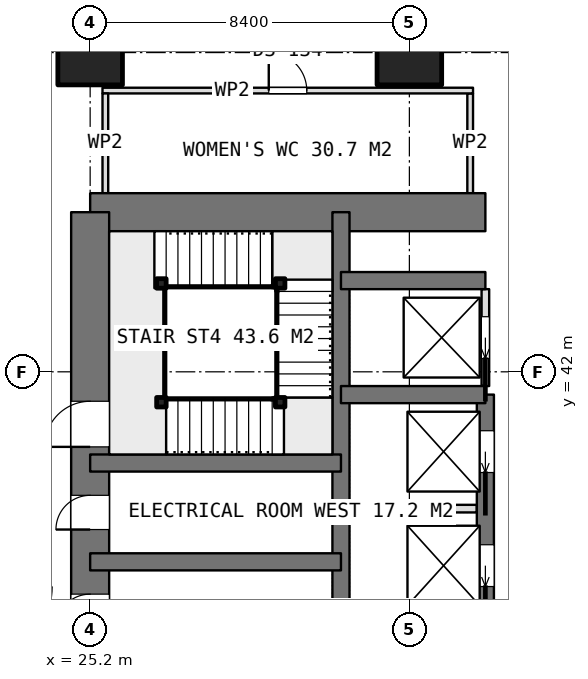
"""IFC4 building model, lengths in metres.
Left out: names, types, materials, properties, quantities, classifications, styles, units other than length and angle.
Written with IfcOpenShell. Run it as: python <this file> out.ifc"""

import sys

from ifc_helpers import new_model, si_unit, direction, frame, frame_2d, origin, origin_2d, place, context, subcontext, project, spatial, rectangle, extrude, element, fill, save


model = new_model("IFC4")
c1 = context("Model", 3, precision=1e-05, world=origin(), true_north=direction((0.0, 1.0)))
c2 = subcontext(c1, "Body", "Model", "MODEL_VIEW")
j1 = project(units=[si_unit("LENGTHUNIT", "METRE"), si_unit("PLANEANGLEUNIT", "RADIAN")], contexts=[c1])
p1 = place(None, origin())
s1 = spatial("IfcSite", under=j1, at=p1, CompositionType="ELEMENT")
p2 = place(p1, origin())
s2 = spatial("IfcBuilding", under=s1, at=p2, CompositionType="ELEMENT")
p3 = place(p2, frame((0.0, 0.0, 125.3)))
s3 = spatial("IfcBuildingStorey", under=s2, at=p3, CompositionType="ELEMENT", Elevation=125.3)
p4 = place(p3, frame((25.2, 46.2, 0.0), z_axis=(0.0, 0.0, 1.0), x_axis=(1.0, 0.0, 0.0)))
e1 = element("IfcWall", 1, at=p4, inside=s3, PredefinedType="SHEAR", context=c2, shape_type="SweptSolid", body=[
    extrude(rectangle(XDim=10.4, YDim=1.0, at=frame_2d((5.2, 0.0))), origin(), (0.0, 0.0, 1.0), 3.75),
])
p5 = place(p3, frame((25.2, 21.0, 0.0), z_axis=(0.0, 0.0, 1.0), x_axis=(0.0, 1.0, 0.0)))
e2 = element("IfcWall", 2, at=p5, inside=s3, PredefinedType="SHEAR", context=c2, shape_type="SweptSolid", body=[
    extrude(rectangle(XDim=25.2, YDim=1.0, at=frame_2d((12.6, 0.0))), origin(), (0.0, 0.0, 1.0), 3.75),
])
p6 = place(p5, frame((7.8, 0.0, 0.0)))
e3 = element("IfcOpeningElement", 3, at=p6, cuts=e2, PredefinedType="OPENING", context=c2, shape_type="SweptSolid", body=[
    extrude(rectangle(XDim=1.2, YDim=2.1, at=frame_2d((0.6, 1.05))), frame((0.0, 0.51, 0.0), z_axis=(0.0, -1.0, 0.0), x_axis=(1.0, 0.0, 0.0)), (0.0, 0.0, 1.0), 1.02),
])
p7 = place(p5, frame((14.25, 0.0, 0.0)))
e4 = element("IfcOpeningElement", 4, at=p7, cuts=e2, PredefinedType="OPENING", context=c2, shape_type="SweptSolid", body=[
    extrude(rectangle(XDim=0.9, YDim=2.1, at=frame_2d((0.45, 1.05))), frame((0.0, 0.51, 0.0), z_axis=(0.0, -1.0, 0.0), x_axis=(1.0, 0.0, 0.0)), (0.0, 0.0, 1.0), 1.02),
])
p8 = place(p5, frame((16.85, 0.0, 0.0)))
e5 = element("IfcOpeningElement", 5, at=p8, cuts=e2, PredefinedType="OPENING", context=c2, shape_type="SweptSolid", body=[
    extrude(rectangle(XDim=0.9, YDim=2.1, at=frame_2d((0.45, 1.05))), frame((0.0, 0.51, 0.0), z_axis=(0.0, -1.0, 0.0), x_axis=(1.0, 0.0, 0.0)), (0.0, 0.0, 1.0), 1.02),
])
p9 = place(p5, frame((19.025, 0.0, 0.0)))
e6 = element("IfcOpeningElement", 6, at=p9, cuts=e2, PredefinedType="OPENING", context=c2, shape_type="SweptSolid", body=[
    extrude(rectangle(XDim=1.2, YDim=2.1, at=frame_2d((0.6, 1.05))), frame((0.0, 0.51, 0.0), z_axis=(0.0, -1.0, 0.0), x_axis=(1.0, 0.0, 0.0)), (0.0, 0.0, 1.0), 1.02),
])
p10 = place(p3, frame((31.8, 21.0, 0.0), z_axis=(0.0, 0.0, 1.0), x_axis=(0.0, 1.0, 0.0)))
e7 = element("IfcWall", 7, at=p10, inside=s3, PredefinedType="SHEAR", context=c2, shape_type="SweptSolid", body=[
    extrude(rectangle(XDim=25.2, YDim=0.45, at=frame_2d((12.6, 0.0))), origin(), (0.0, 0.0, 1.0), 3.75),
])
p11 = place(p3, frame((35.6, 23.4, 0.0), z_axis=(0.0, 0.0, 1.0), x_axis=(0.0, 1.0, 0.0)))
e8 = element("IfcWall", 8, at=p11, inside=s3, PredefinedType="SHEAR", context=c2, shape_type="SweptSolid", body=[
    extrude(rectangle(XDim=18.0, YDim=0.45, at=frame_2d((9.0, 0.0))), origin(), (0.0, 0.0, 1.0), 3.75),
])
p12 = place(p11, frame((0.95, 0.0, 0.0)))
e9 = element("IfcOpeningElement", 9, at=p12, cuts=e8, PredefinedType="OPENING", context=c2, shape_type="SweptSolid", body=[
    extrude(rectangle(XDim=1.1, YDim=2.1, at=frame_2d((0.55, 1.05))), frame((0.0, 0.235, 0.0), z_axis=(0.0, -1.0, 0.0), x_axis=(1.0, 0.0, 0.0)), (0.0, 0.0, 1.0), 0.47),
])
p13 = place(p11, frame((3.95, 0.0, 0.0)))
e10 = element("IfcOpeningElement", 10, at=p13, cuts=e8, PredefinedType="OPENING", context=c2, shape_type="SweptSolid", body=[
    extrude(rectangle(XDim=1.1, YDim=2.1, at=frame_2d((0.55, 1.05))), frame((0.0, 0.235, 0.0), z_axis=(0.0, -1.0, 0.0), x_axis=(1.0, 0.0, 0.0)), (0.0, 0.0, 1.0), 0.47),
])
p14 = place(p11, frame((6.95, 0.0, 0.0)))
e11 = element("IfcOpeningElement", 11, at=p14, cuts=e8, PredefinedType="OPENING", context=c2, shape_type="SweptSolid", body=[
    extrude(rectangle(XDim=1.1, YDim=2.1, at=frame_2d((0.55, 1.05))), frame((0.0, 0.235, 0.0), z_axis=(0.0, -1.0, 0.0), x_axis=(1.0, 0.0, 0.0)), (0.0, 0.0, 1.0), 0.47),
])
p15 = place(p11, frame((9.95, 0.0, 0.0)))
e12 = element("IfcOpeningElement", 12, at=p15, cuts=e8, PredefinedType="OPENING", context=c2, shape_type="SweptSolid", body=[
    extrude(rectangle(XDim=1.1, YDim=2.1, at=frame_2d((0.55, 1.05))), frame((0.0, 0.235, 0.0), z_axis=(0.0, -1.0, 0.0), x_axis=(1.0, 0.0, 0.0)), (0.0, 0.0, 1.0), 0.47),
])
p16 = place(p11, frame((12.95, 0.0, 0.0)))
e13 = element("IfcOpeningElement", 13, at=p16, cuts=e8, PredefinedType="OPENING", context=c2, shape_type="SweptSolid", body=[
    extrude(rectangle(XDim=1.1, YDim=2.1, at=frame_2d((0.55, 1.05))), frame((0.0, 0.235, 0.0), z_axis=(0.0, -1.0, 0.0), x_axis=(1.0, 0.0, 0.0)), (0.0, 0.0, 1.0), 0.47),
])
p17 = place(p11, frame((15.95, 0.0, 0.0)))
e14 = element("IfcOpeningElement", 14, at=p17, cuts=e8, PredefinedType="OPENING", context=c2, shape_type="SweptSolid", body=[
    extrude(rectangle(XDim=1.1, YDim=2.1, at=frame_2d((0.55, 1.05))), frame((0.0, 0.235, 0.0), z_axis=(0.0, -1.0, 0.0), x_axis=(1.0, 0.0, 0.0)), (0.0, 0.0, 1.0), 0.47),
])
for number, where, z_axis, x_axis in (
    (15, (31.8, 41.4, 0.0), (0.0, 0.0, 1.0), (1.0, 0.0, 0.0)),
    (16, (31.8, 44.4, 0.0), (0.0, 0.0, 1.0), (1.0, 0.0, 0.0)),
):
    element("IfcWall", number, at=place(p3, frame(where, z_axis=z_axis, x_axis=x_axis)), inside=s3, PredefinedType="SHEAR", context=c2, shape_type="SweptSolid", body=[
        extrude(rectangle(XDim=3.8, YDim=0.45, at=frame_2d((1.9, 0.0))), origin(), (0.0, 0.0, 1.0), 3.75),
    ])
for number, where, z_axis, x_axis in (
    (17, (25.2, 37.0, 0.0), (0.0, 0.0, 1.0), (1.0, 0.0, 0.0)),
    (18, (25.2, 39.6, 0.0), (0.0, 0.0, 1.0), (1.0, 0.0, 0.0)),
):
    element("IfcWall", number, at=place(p3, frame(where, z_axis=z_axis, x_axis=x_axis)), inside=s3, PredefinedType="SHEAR", context=c2, shape_type="SweptSolid", body=[
        extrude(rectangle(XDim=6.6, YDim=0.45, at=frame_2d((3.3, 0.0))), origin(), (0.0, 0.0, 1.0), 3.75),
    ])
for number, where, z_axis, x_axis in (
    (19, (25.2, 50.4, 0.0), (0.0, 0.0, 1.0), (1.0, 0.0, 0.0)),
    (20, (33.6, 50.4, 0.0), (0.0, 0.0, 1.0), (1.0, 0.0, 0.0)),
):
    element("IfcColumn", number, at=place(p3, frame(where, z_axis=z_axis, x_axis=x_axis)), inside=s3, PredefinedType="COLUMN", context=c2, shape_type="SweptSolid", body=[
        extrude(rectangle(XDim=1.7, YDim=1.7, at=origin_2d()), origin(), (0.0, 0.0, 1.0), 3.75),
    ])
p18 = place(p3, frame((32.025, 38.4, 0.0), z_axis=(0.0, 0.0, 1.0), x_axis=(1.0, 0.0, 0.0)))
e21 = element("IfcWall", 21, at=p18, inside=s3, PredefinedType="PARTITIONING", context=c2, shape_type="SweptSolid", body=[
    extrude(rectangle(XDim=3.35, YDim=0.2, at=frame_2d((1.675, 0.0))), origin(), (0.0, 0.0, 1.0), 3.5),
])
p19 = place(p3, frame((35.6, 41.625, 0.0), z_axis=(0.0, 0.0, 1.0), x_axis=(0.0, 1.0, 0.0)))
e22 = element("IfcWall", 22, at=p19, inside=s3, PredefinedType="PARTITIONING", context=c2, shape_type="SweptSolid", body=[
    extrude(rectangle(XDim=2.55, YDim=0.2, at=frame_2d((1.275, 0.0))), origin(), (0.0, 0.0, 1.0), 3.5),
])
p20 = place(p19, frame((0.725, 0.0, 0.0)))
e23 = element("IfcOpeningElement", 23, at=p20, cuts=e22, PredefinedType="OPENING", context=c2, shape_type="SweptSolid", body=[
    extrude(rectangle(XDim=1.1, YDim=2.1, at=frame_2d((0.55, 1.05))), frame((0.0, 0.11, 0.0), z_axis=(0.0, -1.0, 0.0), x_axis=(1.0, 0.0, 0.0)), (0.0, 0.0, 1.0), 0.22),
])
p21 = place(p3, frame((25.525, 49.4, 0.0), z_axis=(0.0, 0.0, 1.0), x_axis=(1.0, 0.0, 0.0)))
e24 = element("IfcWall", 24, at=p21, inside=s3, PredefinedType="PARTITIONING", context=c2, shape_type="SweptSolid", body=[
    extrude(rectangle(XDim=9.75, YDim=0.15, at=frame_2d((4.875, 0.0))), origin(), (0.0, 0.0, 1.0), 3.5),
])
p22 = place(p21, frame((4.375, 0.0, 0.0)))
e25 = element("IfcOpeningElement", 25, at=p22, cuts=e24, PredefinedType="OPENING", context=c2, shape_type="SweptSolid", body=[
    extrude(rectangle(XDim=1.0, YDim=2.1, at=frame_2d((0.5, 1.05))), frame((0.0, 0.085, 0.0), z_axis=(0.0, -1.0, 0.0), x_axis=(1.0, 0.0, 0.0)), (0.0, 0.0, 1.0), 0.17),
])
for number, where, z_axis, x_axis in (
    (26, (25.6, 46.7, 0.0), (0.0, 0.0, 1.0), (0.0, 1.0, 0.0)),
    (27, (35.2, 46.7, 0.0), (0.0, 0.0, 1.0), (0.0, 1.0, 0.0)),
):
    element("IfcWall", number, at=place(p3, frame(where, z_axis=z_axis, x_axis=x_axis)), inside=s3, PredefinedType="PARTITIONING", context=c2, shape_type="SweptSolid", body=[
        extrude(rectangle(XDim=2.625, YDim=0.15, at=frame_2d((1.312, 0.0))), origin(), (0.0, 0.0, 1.0), 3.5),
    ])
for number, where, z_axis, x_axis in (
    (28, (27.075, 41.2, 0.0), (0.0, 0.0, 1.0), (1.0, 0.0, 0.0)),
    (29, (30.2, 41.2, 0.0), (0.0, 0.0, 1.0), (1.0, 0.0, 0.0)),
    (30, (30.2, 44.325, 0.0), (0.0, 0.0, 1.0), (1.0, 0.0, 0.0)),
    (31, (27.075, 44.325, 0.0), (0.0, 0.0, 1.0), (1.0, 0.0, 0.0)),
):
    element("IfcColumn", number, at=place(p3, frame(where, z_axis=z_axis, x_axis=x_axis)), inside=s3, PredefinedType="COLUMN", context=c2, shape_type="SweptSolid", body=[
        extrude(rectangle(XDim=0.25, YDim=0.25, at=origin_2d()), origin(), (0.0, 0.0, 1.0), 3.75),
    ])
p23 = place(p7, origin())
e32 = element("IfcDoor", 32, at=p23, inside=s3, OperationType="SINGLE_SWING_LEFT", PredefinedType="DOOR", context=c2, shape_type="SweptSolid", body=[
    extrude(rectangle(XDim=0.9, YDim=2.1, at=frame_2d((0.45, 1.05))), frame((0.0, 0.025, 0.0), z_axis=(0.0, -1.0, 0.0), x_axis=(1.0, 0.0, 0.0)), (0.0, 0.0, 1.0), 0.05),
])
fill(e4, e32)
p24 = place(p8, origin())
e33 = element("IfcDoor", 33, at=p24, inside=s3, OperationType="SINGLE_SWING_LEFT", PredefinedType="DOOR", context=c2, shape_type="SweptSolid", body=[
    extrude(rectangle(XDim=0.9, YDim=2.1, at=frame_2d((0.45, 1.05))), frame((0.0, 0.025, 0.0), z_axis=(0.0, -1.0, 0.0), x_axis=(1.0, 0.0, 0.0)), (0.0, 0.0, 1.0), 0.05),
])
fill(e5, e33)
p25 = place(p16, origin())
e34 = element("IfcDoor", 34, at=p25, inside=s3, OperationType="SLIDING_TO_LEFT", PredefinedType="USERDEFINED", context=c2, shape_type="SweptSolid", body=[
    extrude(rectangle(XDim=1.1, YDim=2.1, at=frame_2d((0.55, 1.05))), frame((0.0, 0.025, 0.0), z_axis=(0.0, -1.0, 0.0), x_axis=(1.0, 0.0, 0.0)), (0.0, 0.0, 1.0), 0.05),
])
fill(e13, e34)
p26 = place(p17, origin())
e35 = element("IfcDoor", 35, at=p26, inside=s3, OperationType="SLIDING_TO_LEFT", PredefinedType="USERDEFINED", context=c2, shape_type="SweptSolid", body=[
    extrude(rectangle(XDim=1.1, YDim=2.1, at=frame_2d((0.55, 1.05))), frame((0.0, 0.025, 0.0), z_axis=(0.0, -1.0, 0.0), x_axis=(1.0, 0.0, 0.0)), (0.0, 0.0, 1.0), 0.05),
])
fill(e14, e35)
p27 = place(p20, origin())
e36 = element("IfcDoor", 36, at=p27, inside=s3, OperationType="SLIDING_TO_LEFT", PredefinedType="USERDEFINED", context=c2, shape_type="SweptSolid", body=[
    extrude(rectangle(XDim=1.1, YDim=2.1, at=frame_2d((0.55, 1.05))), frame((0.0, 0.025, 0.0), z_axis=(0.0, -1.0, 0.0), x_axis=(1.0, 0.0, 0.0)), (0.0, 0.0, 1.0), 0.05),
])
fill(e23, e36)
p28 = place(p22, origin())
e37 = element("IfcDoor", 37, at=p28, inside=s3, OperationType="SINGLE_SWING_LEFT", PredefinedType="DOOR", context=c2, shape_type="SweptSolid", body=[
    extrude(rectangle(XDim=1.0, YDim=2.1, at=frame_2d((0.5, 1.05))), frame((0.0, 0.025, 0.0), z_axis=(0.0, -1.0, 0.0), x_axis=(1.0, 0.0, 0.0)), (0.0, 0.0, 1.0), 0.05),
])
fill(e25, e37)
p29 = place(p9, origin())
e38 = element("IfcDoor", 38, at=p29, inside=s3, OperationType="SINGLE_SWING_RIGHT", PredefinedType="DOOR", context=c2, shape_type="SweptSolid", body=[
    extrude(rectangle(XDim=1.2, YDim=2.1, at=frame_2d((0.6, 1.05))), frame((0.0, 0.025, 0.0), z_axis=(0.0, -1.0, 0.0), x_axis=(1.0, 0.0, 0.0)), (0.0, 0.0, 1.0), 0.05),
])
fill(e6, e38)
save(model, sys.argv[1])
